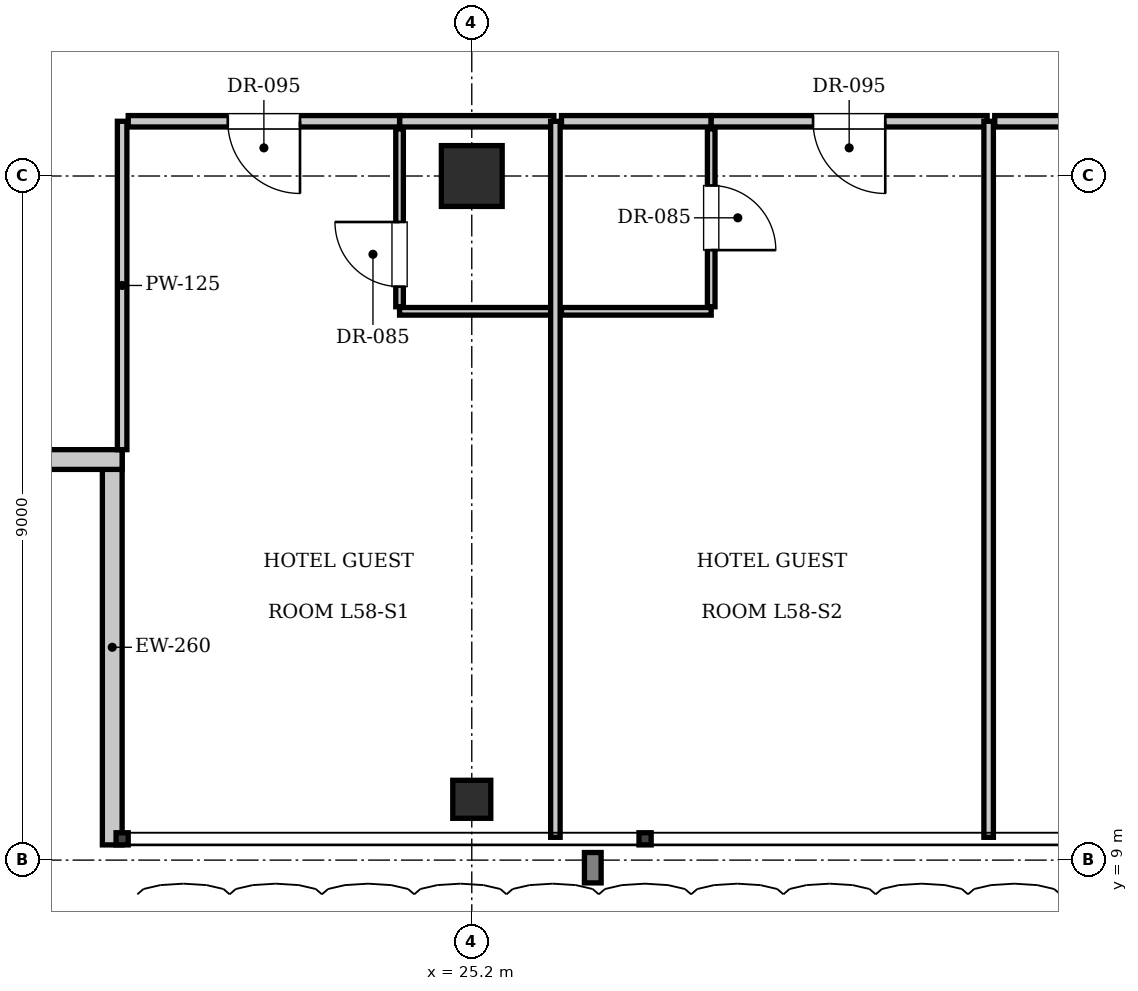
"""IFC4 building model, lengths in metres.
Left out: names, types, materials, properties, quantities, classifications, styles, units other than length and angle.
Written with IfcOpenShell. Run it as: python <this file> out.ifc"""

import sys

from ifc_helpers import new_model, si_unit, direction, frame, frame_2d, origin, origin_2d, place, context, subcontext, project, spatial, rectangle, i_section, extrude, element, fill, save


model = new_model("IFC4")
c1 = context("Model", 3, precision=1e-05, world=origin(), true_north=direction((0.0, 1.0)))
c2 = subcontext(c1, "Body", "Model", "MODEL_VIEW")
j1 = project(units=[si_unit("LENGTHUNIT", "METRE"), si_unit("PLANEANGLEUNIT", "RADIAN")], contexts=[c1])
p1 = place(None, origin())
s1 = spatial("IfcSite", under=j1, at=p1, CompositionType="ELEMENT")
p2 = place(p1, origin())
s2 = spatial("IfcBuilding", under=s1, at=p2, CompositionType="ELEMENT")
p3 = place(p2, frame((0.0, 0.0, 239.4)))
s3 = spatial("IfcBuildingStorey", under=s2, at=p3, CompositionType="ELEMENT", Elevation=239.4)
p4 = place(p3, frame((25.2, 18.0, 0.0), z_axis=(0.0, 0.0, 1.0), x_axis=(1.0, 0.0, 0.0)))
e1 = element("IfcColumn", 1, at=p4, inside=s3, PredefinedType="COLUMN", context=c2, shape_type="SweptSolid", body=[
    extrude(rectangle(XDim=0.8, YDim=0.8, at=origin_2d()), origin(), (0.0, 0.0, 1.0), 3.85),
])
p5 = place(p3, frame((25.2, 9.8, 0.0), z_axis=(0.0, 0.0, 1.0), x_axis=(1.0, 0.0, 0.0)))
e2 = element("IfcColumn", 2, at=p5, inside=s3, PredefinedType="COLUMN", context=c2, shape_type="SweptSolid", body=[
    extrude(i_section(OverallWidth=0.5, OverallDepth=0.5, WebThickness=0.022, FlangeThickness=0.032, at=origin_2d()), origin(), (0.0, 0.0, 1.0), 3.85),
])
p6 = place(p3, frame((20.47, 9.2, 0.0), z_axis=(0.0, 0.0, 1.0), x_axis=(0.0, 1.0, 0.0)))
e3 = element("IfcWall", 3, at=p6, inside=s3, PredefinedType="SOLIDWALL", context=c2, shape_type="SweptSolid", body=[
    extrude(rectangle(XDim=5.2, YDim=0.26, at=frame_2d((2.6, 0.0))), origin(), (0.0, 0.0, 1.0), 3.61),
])
p7 = place(p3, frame((20.6, 14.27, 0.0), z_axis=(0.0, 0.0, 1.0), x_axis=(-1.0, 0.0, 0.0)))
e4 = element("IfcWall", 4, at=p7, inside=s3, PredefinedType="SOLIDWALL", context=c2, shape_type="SweptSolid", body=[
    extrude(rectangle(XDim=5.2, YDim=0.26, at=frame_2d((2.6, 0.0))), origin(), (0.0, 0.0, 1.0), 3.61),
])
p8 = place(p7, frame((1.6, 0.0, 0.9)))
e5 = element("IfcOpeningElement", 5, at=p8, cuts=e4, PredefinedType="OPENING", context=c2, shape_type="SweptSolid", body=[
    extrude(rectangle(XDim=2.0, YDim=2.2, at=frame_2d((1.0, 1.1))), frame((0.0, 0.14, 0.0), z_axis=(0.0, -1.0, 0.0), x_axis=(1.0, 0.0, 0.0)), (0.0, 0.0, 1.0), 0.28),
])
p9 = place(p3, frame((20.6, 14.4, 0.0), z_axis=(0.0, 0.0, 1.0), x_axis=(0.0, 1.0, 0.0)))
e6 = element("IfcWall", 6, at=p9, inside=s3, PredefinedType="PARTITIONING", context=c2, shape_type="SweptSolid", body=[
    extrude(rectangle(XDim=4.32, YDim=0.125, at=frame_2d((2.16, 0.0))), origin(), (0.0, 0.0, 1.0), 3.61),
])
p10 = place(p3, frame((24.25, 18.72, 0.0), z_axis=(0.0, 0.0, 1.0), x_axis=(1.0, 0.0, 0.0)))
e7 = element("IfcWall", 7, at=p10, inside=s3, PredefinedType="PARTITIONING", context=c2, shape_type="SweptSolid", body=[
    extrude(rectangle(XDim=2.03, YDim=0.15, at=frame_2d((1.015, 0.0))), origin(), (0.0, 0.0, 1.0), 3.61),
])
p11 = place(p3, frame((24.25, 16.22, 0.0), z_axis=(0.0, 0.0, 1.0), x_axis=(1.0, 0.0, 0.0)))
e8 = element("IfcWall", 8, at=p11, inside=s3, PredefinedType="PARTITIONING", context=c2, shape_type="SweptSolid", body=[
    extrude(rectangle(XDim=2.01, YDim=0.1, at=frame_2d((1.005, 0.0))), origin(), (0.0, 0.0, 1.0), 3.61),
])
p12 = place(p3, frame((24.25, 16.28, 0.0), z_axis=(0.0, 0.0, 1.0), x_axis=(0.0, 1.0, 0.0)))
e9 = element("IfcWall", 9, at=p12, inside=s3, PredefinedType="PARTITIONING", context=c2, shape_type="SweptSolid", body=[
    extrude(rectangle(XDim=2.34, YDim=0.1, at=frame_2d((1.17, 0.0))), origin(), (0.0, 0.0, 1.0), 3.61),
])
p13 = place(p12, frame((0.265, 0.0, 0.0)))
e10 = element("IfcOpeningElement", 10, at=p13, cuts=e9, PredefinedType="OPENING", context=c2, shape_type="SweptSolid", body=[
    extrude(rectangle(XDim=0.85, YDim=2.1, at=frame_2d((0.425, 1.05))), frame((0.0, 0.06, 0.0), z_axis=(0.0, -1.0, 0.0), x_axis=(1.0, 0.0, 0.0)), (0.0, 0.0, 1.0), 0.12),
])
p14 = place(p3, frame((20.68, 18.72, 0.0), z_axis=(0.0, 0.0, 1.0), x_axis=(1.0, 0.0, 0.0)))
e11 = element("IfcWall", 11, at=p14, inside=s3, PredefinedType="PARTITIONING", context=c2, shape_type="SweptSolid", body=[
    extrude(rectangle(XDim=3.57, YDim=0.15, at=frame_2d((1.785, 0.0))), origin(), (0.0, 0.0, 1.0), 3.61),
])
p15 = place(p14, frame((1.31, 0.0, 0.0)))
e12 = element("IfcOpeningElement", 12, at=p15, cuts=e11, PredefinedType="OPENING", context=c2, shape_type="SweptSolid", body=[
    extrude(rectangle(XDim=0.95, YDim=2.15, at=frame_2d((0.475, 1.075))), frame((0.0, 0.085, 0.0), z_axis=(0.0, -1.0, 0.0), x_axis=(1.0, 0.0, 0.0)), (0.0, 0.0, 1.0), 0.17),
])
p16 = place(p3, frame((26.3, 9.3, 0.0), z_axis=(0.0, 0.0, 1.0), x_axis=(0.0, 1.0, 0.0)))
e13 = element("IfcWall", 13, at=p16, inside=s3, PredefinedType="PARTITIONING", context=c2, shape_type="SweptSolid", body=[
    extrude(rectangle(XDim=9.42, YDim=0.125, at=frame_2d((4.71, 0.0))), origin(), (0.0, 0.0, 1.0), 3.61),
])
p17 = place(p3, frame((26.38, 18.72, 0.0), z_axis=(0.0, 0.0, 1.0), x_axis=(1.0, 0.0, 0.0)))
e14 = element("IfcWall", 14, at=p17, inside=s3, PredefinedType="PARTITIONING", context=c2, shape_type="SweptSolid", body=[
    extrude(rectangle(XDim=1.97, YDim=0.15, at=frame_2d((0.985, 0.0))), origin(), (0.0, 0.0, 1.0), 3.61),
])
p18 = place(p3, frame((26.38, 16.22, 0.0), z_axis=(0.0, 0.0, 1.0), x_axis=(1.0, 0.0, 0.0)))
e15 = element("IfcWall", 15, at=p18, inside=s3, PredefinedType="PARTITIONING", context=c2, shape_type="SweptSolid", body=[
    extrude(rectangle(XDim=1.97, YDim=0.1, at=frame_2d((0.985, 0.0))), origin(), (0.0, 0.0, 1.0), 3.61),
])
p19 = place(p3, frame((28.35, 16.28, 0.0), z_axis=(0.0, 0.0, 1.0), x_axis=(0.0, 1.0, 0.0)))
e16 = element("IfcWall", 16, at=p19, inside=s3, PredefinedType="PARTITIONING", context=c2, shape_type="SweptSolid", body=[
    extrude(rectangle(XDim=2.34, YDim=0.1, at=frame_2d((1.17, 0.0))), origin(), (0.0, 0.0, 1.0), 3.61),
])
p20 = place(p19, frame((0.745, 0.0, 0.0)))
e17 = element("IfcOpeningElement", 17, at=p20, cuts=e16, PredefinedType="OPENING", context=c2, shape_type="SweptSolid", body=[
    extrude(rectangle(XDim=0.85, YDim=2.1, at=frame_2d((0.425, 1.05))), frame((0.0, 0.06, 0.0), z_axis=(0.0, -1.0, 0.0), x_axis=(1.0, 0.0, 0.0)), (0.0, 0.0, 1.0), 0.12),
])
p21 = place(p3, frame((28.35, 18.72, 0.0), z_axis=(0.0, 0.0, 1.0), x_axis=(1.0, 0.0, 0.0)))
e18 = element("IfcWall", 18, at=p21, inside=s3, PredefinedType="PARTITIONING", context=c2, shape_type="SweptSolid", body=[
    extrude(rectangle(XDim=3.63, YDim=0.15, at=frame_2d((1.815, 0.0))), origin(), (0.0, 0.0, 1.0), 3.61),
])
p22 = place(p21, frame((1.34, 0.0, 0.0)))
e19 = element("IfcOpeningElement", 19, at=p22, cuts=e18, PredefinedType="OPENING", context=c2, shape_type="SweptSolid", body=[
    extrude(rectangle(XDim=0.95, YDim=2.15, at=frame_2d((0.475, 1.075))), frame((0.0, 0.085, 0.0), z_axis=(0.0, -1.0, 0.0), x_axis=(1.0, 0.0, 0.0)), (0.0, 0.0, 1.0), 0.17),
])
p23 = place(p3, frame((32.0, 9.3, 0.0), z_axis=(0.0, 0.0, 1.0), x_axis=(0.0, 1.0, 0.0)))
e20 = element("IfcWall", 20, at=p23, inside=s3, PredefinedType="PARTITIONING", context=c2, shape_type="SweptSolid", body=[
    extrude(rectangle(XDim=9.42, YDim=0.125, at=frame_2d((4.71, 0.0))), origin(), (0.0, 0.0, 1.0), 3.61),
])
p24 = place(p3, frame((32.08, 18.72, 0.0), z_axis=(0.0, 0.0, 1.0), x_axis=(1.0, 0.0, 0.0)))
e21 = element("IfcWall", 21, at=p24, inside=s3, PredefinedType="PARTITIONING", context=c2, shape_type="SweptSolid", body=[
    extrude(rectangle(XDim=3.63, YDim=0.15, at=frame_2d((1.815, 0.0))), origin(), (0.0, 0.0, 1.0), 3.61),
])
p25 = place(p24, frame((2.3, 0.0, 0.0)))
e22 = element("IfcOpeningElement", 22, at=p25, cuts=e21, PredefinedType="OPENING", context=c2, shape_type="SweptSolid", body=[
    extrude(rectangle(XDim=0.95, YDim=2.15, at=frame_2d((0.475, 1.075))), frame((0.0, 0.085, 0.0), z_axis=(0.0, -1.0, 0.0), x_axis=(1.0, 0.0, 0.0)), (0.0, 0.0, 1.0), 0.17),
])
p26 = place(p13, origin())
e23 = element("IfcDoor", 23, at=p26, inside=s3, OperationType="SINGLE_SWING_RIGHT", PredefinedType="DOOR", context=c2, shape_type="SweptSolid", body=[
    extrude(rectangle(XDim=0.85, YDim=2.1, at=frame_2d((0.425, 1.05))), frame((0.0, 0.025, 0.0), z_axis=(0.0, -1.0, 0.0), x_axis=(1.0, 0.0, 0.0)), (0.0, 0.0, 1.0), 0.05),
])
fill(e10, e23)
p27 = place(p15, frame((0.95, 0.0, 0.0), z_axis=(0.0, 0.0, 1.0), x_axis=(-1.0, 0.0, 0.0)))
e24 = element("IfcDoor", 24, at=p27, inside=s3, OperationType="SINGLE_SWING_LEFT", PredefinedType="DOOR", context=c2, shape_type="SweptSolid", body=[
    extrude(rectangle(XDim=0.95, YDim=2.15, at=frame_2d((0.475, 1.075))), frame((0.0, 0.025, 0.0), z_axis=(0.0, -1.0, 0.0), x_axis=(1.0, 0.0, 0.0)), (0.0, 0.0, 1.0), 0.05),
])
fill(e12, e24)
p28 = place(p20, frame((0.85, 0.0, 0.0), z_axis=(0.0, 0.0, 1.0), x_axis=(-1.0, 0.0, 0.0)))
e25 = element("IfcDoor", 25, at=p28, inside=s3, OperationType="SINGLE_SWING_RIGHT", PredefinedType="DOOR", context=c2, shape_type="SweptSolid", body=[
    extrude(rectangle(XDim=0.85, YDim=2.1, at=frame_2d((0.425, 1.05))), frame((0.0, 0.025, 0.0), z_axis=(0.0, -1.0, 0.0), x_axis=(1.0, 0.0, 0.0)), (0.0, 0.0, 1.0), 0.05),
])
fill(e17, e25)
p29 = place(p22, frame((0.95, 0.0, 0.0), z_axis=(0.0, 0.0, 1.0), x_axis=(-1.0, 0.0, 0.0)))
e26 = element("IfcDoor", 26, at=p29, inside=s3, OperationType="SINGLE_SWING_LEFT", PredefinedType="DOOR", context=c2, shape_type="SweptSolid", body=[
    extrude(rectangle(XDim=0.95, YDim=2.15, at=frame_2d((0.475, 1.075))), frame((0.0, 0.025, 0.0), z_axis=(0.0, -1.0, 0.0), x_axis=(1.0, 0.0, 0.0)), (0.0, 0.0, 1.0), 0.05),
])
fill(e19, e26)
save(model, sys.argv[1])
